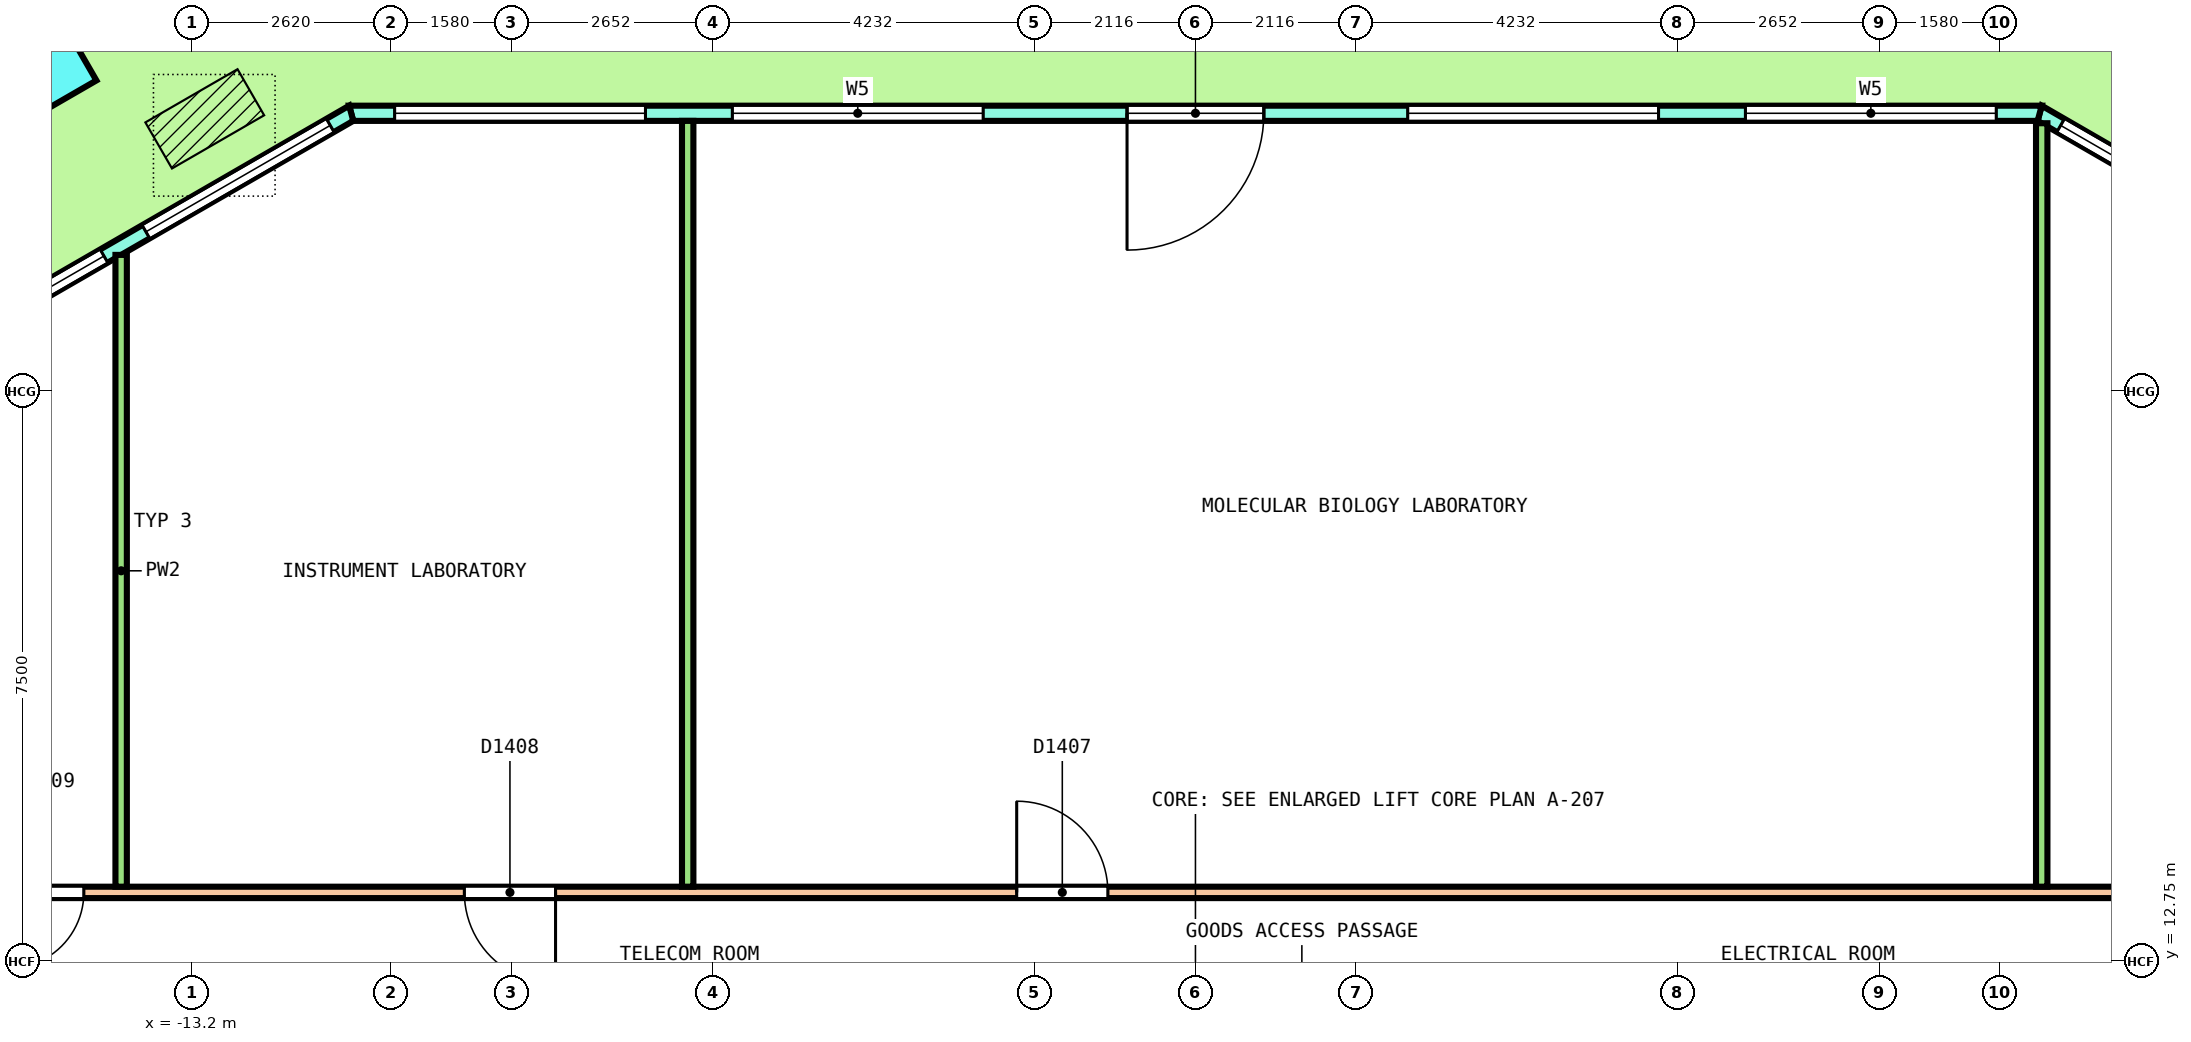
"""IFC4 building model, lengths in metres.
Left out: names, types, materials, properties, quantities, classifications, styles, units other than length and angle.
Written with IfcOpenShell. Run it as: python <this file> out.ifc"""

import sys

from ifc_helpers import new_model, si_unit, direction, frame, frame_2d, origin, origin_2d, place, context, subcontext, project, spatial, polyline, rectangle, outline, extrude, element, fill, save


model = new_model("IFC4")
c1 = context("Model", 3, precision=1e-05, world=origin(), true_north=direction((0.0, 1.0)))
c2 = subcontext(c1, "Body", "Model", "MODEL_VIEW")
j1 = project(units=[si_unit("LENGTHUNIT", "METRE"), si_unit("PLANEANGLEUNIT", "RADIAN")], contexts=[c1])
p1 = place(None, origin())
s1 = spatial("IfcSite", under=j1, at=p1, CompositionType="ELEMENT")
p2 = place(p1, origin())
s2 = spatial("IfcBuilding", under=s1, at=p2, CompositionType="ELEMENT")
p3 = place(p2, frame((0.0, 0.0, 49.8)))
s3 = spatial("IfcBuildingStorey", under=s2, at=p3, CompositionType="ELEMENT", Elevation=49.8)
p4 = place(p3, frame((-15.484, 24.606, 0.0), z_axis=(-0.036265236264, 0.0, 0.999342199969), x_axis=(-0.865313546461, -0.500246354177, -0.031401456084)))
e1 = element("IfcColumn", 1, at=p4, inside=s3, PredefinedType="COLUMN", context=c2, shape_type="SweptSolid", body=[
    extrude(rectangle(XDim=1.5, YDim=1.5, at=origin_2d()), origin(), (0.0, 0.0, 1.0), 4.053),
])
p5 = place(p3, frame((17.061, 20.463, 0.0), z_axis=(0.0, 0.0, 1.0), x_axis=(-0.866029458321, 0.49999297727, 0.0)))
e2 = element("IfcWall", 2, at=p5, inside=s3, PredefinedType="SOLIDWALL", context=c2, shape_type="SweptSolid", body=[
    extrude(outline(polyline([(-0.027, -0.1), (1.128, -0.1), (2.282, -0.1), (3.437, -0.1), (4.592, -0.1), (5.747, -0.1), (6.901, -0.1), (6.848, 0.1), (5.711, 0.1), (4.574, 0.1), (3.437, 0.1), (2.301, 0.1), (1.164, 0.1), (0.027, 0.1), (-0.027, -0.1)])), origin(), (0.0, 0.0, 1.0), 4.1),
])
p6 = place(p5, frame((0.319, 0.0, 0.1)))
e3 = element("IfcOpeningElement", 3, at=p6, cuts=e2, PredefinedType="OPENING", context=c2, shape_type="SweptSolid", body=[
    extrude(rectangle(XDim=2.8, YDim=2.9, at=frame_2d((1.4, 1.45))), frame((0.0, 0.11, 0.0), z_axis=(0.0, -1.0, 0.0), x_axis=(1.0, 0.0, 0.0)), (0.0, 0.0, 1.0), 0.22),
])
p7 = place(p5, frame((3.756, 0.0, 0.1)))
e4 = element("IfcOpeningElement", 4, at=p7, cuts=e2, PredefinedType="OPENING", context=c2, shape_type="SweptSolid", body=[
    extrude(rectangle(XDim=2.8, YDim=2.9, at=frame_2d((1.4, 1.45))), frame((0.0, 0.11, 0.0), z_axis=(0.0, -1.0, 0.0), x_axis=(1.0, 0.0, 0.0)), (0.0, 0.0, 1.0), 0.22),
])
p8 = place(p3, frame((11.107, 23.9, 0.0), z_axis=(0.0, 0.0, 1.0), x_axis=(-1.0, 0.0, 0.0)))
e5 = element("IfcWall", 5, at=p8, inside=s3, PredefinedType="SOLIDWALL", context=c2, shape_type="SweptSolid", body=[
    extrude(outline(polyline([(-0.027, -0.1), (0.985, -0.1), (1.998, -0.1), (3.01, -0.1), (4.022, -0.1), (5.034, -0.1), (6.046, -0.1), (7.058, -0.1), (8.071, -0.1), (9.083, -0.1), (10.095, -0.1), (11.107, -0.1), (12.119, -0.1), (13.131, -0.1), (14.143, -0.1), (15.156, -0.1), (16.168, -0.1), (17.18, -0.1), (18.192, -0.1), (19.204, -0.1), (20.216, -0.1), (21.229, -0.1), (22.241, -0.1), (22.187, 0.1), (21.18, 0.1), (20.172, 0.1), (19.165, 0.1), (18.158, 0.1), (17.151, 0.1), (16.143, 0.1), (15.136, 0.1), (14.129, 0.1), (13.122, 0.1), (12.114, 0.1), (11.107, 0.1), (10.1, 0.1), (9.092, 0.1), (8.085, 0.1), (7.078, 0.1), (6.071, 0.1), (5.063, 0.1), (4.056, 0.1), (3.049, 0.1), (2.042, 0.1), (1.034, 0.1), (0.027, 0.1), (-0.027, -0.1)])), origin(), (0.0, 0.0, 1.0), 4.1),
])
p9 = place(p8, frame((0.571, 0.0, 0.1)))
e6 = element("IfcOpeningElement", 6, at=p9, cuts=e5, PredefinedType="OPENING", context=c2, shape_type="SweptSolid", body=[
    extrude(rectangle(XDim=3.3, YDim=2.9, at=frame_2d((1.65, 1.45))), frame((0.0, 0.11, 0.0), z_axis=(0.0, -1.0, 0.0), x_axis=(1.0, 0.0, 0.0)), (0.0, 0.0, 1.0), 0.22),
])
p10 = place(p8, frame((5.014, 0.0, 0.1)))
e7 = element("IfcOpeningElement", 7, at=p10, cuts=e5, PredefinedType="OPENING", context=c2, shape_type="SweptSolid", body=[
    extrude(rectangle(XDim=3.3, YDim=2.9, at=frame_2d((1.65, 1.45))), frame((0.0, 0.11, 0.0), z_axis=(0.0, -1.0, 0.0), x_axis=(1.0, 0.0, 0.0)), (0.0, 0.0, 1.0), 0.22),
])
p11 = place(p8, frame((10.207, 0.0, 0.0)))
e8 = element("IfcOpeningElement", 8, at=p11, cuts=e5, PredefinedType="OPENING", context=c2, shape_type="SweptSolid", body=[
    extrude(rectangle(XDim=1.8, YDim=2.4, at=frame_2d((0.9, 1.2))), frame((0.0, 0.11, 0.0), z_axis=(0.0, -1.0, 0.0), x_axis=(1.0, 0.0, 0.0)), (0.0, 0.0, 1.0), 0.22),
])
p12 = place(p8, frame((10.207, 0.0, 2.55)))
e9 = element("IfcOpeningElement", 9, at=p12, cuts=e5, PredefinedType="OPENING", context=c2, shape_type="SweptSolid", body=[
    extrude(rectangle(XDim=1.8, YDim=0.45, at=frame_2d((0.9, 0.225))), frame((0.0, 0.11, 0.0), z_axis=(0.0, -1.0, 0.0), x_axis=(1.0, 0.0, 0.0)), (0.0, 0.0, 1.0), 0.22),
])
p13 = place(p8, frame((13.9, 0.0, 0.1)))
e10 = element("IfcOpeningElement", 10, at=p13, cuts=e5, PredefinedType="OPENING", context=c2, shape_type="SweptSolid", body=[
    extrude(rectangle(XDim=3.3, YDim=2.9, at=frame_2d((1.65, 1.45))), frame((0.0, 0.11, 0.0), z_axis=(0.0, -1.0, 0.0), x_axis=(1.0, 0.0, 0.0)), (0.0, 0.0, 1.0), 0.22),
])
p14 = place(p8, frame((18.343, 0.0, 0.1)))
e11 = element("IfcOpeningElement", 11, at=p14, cuts=e5, PredefinedType="OPENING", context=c2, shape_type="SweptSolid", body=[
    extrude(rectangle(XDim=3.3, YDim=2.9, at=frame_2d((1.65, 1.45))), frame((0.0, 0.11, 0.0), z_axis=(0.0, -1.0, 0.0), x_axis=(1.0, 0.0, 0.0)), (0.0, 0.0, 1.0), 0.22),
])
p15 = place(p3, frame((-11.107, 23.9, 0.0), z_axis=(0.0, 0.0, 1.0), x_axis=(-0.866029458321, -0.49999297727, 0.0)))
e12 = element("IfcWall", 12, at=p15, inside=s3, PredefinedType="SOLIDWALL", context=c2, shape_type="SweptSolid", body=[
    extrude(outline(polyline([(-0.027, -0.1), (1.128, -0.1), (2.282, -0.1), (3.437, -0.1), (4.592, -0.1), (5.747, -0.1), (6.901, -0.1), (6.848, 0.1), (5.711, 0.1), (4.574, 0.1), (3.437, 0.1), (2.301, 0.1), (1.164, 0.1), (0.027, 0.1), (-0.027, -0.1)])), origin(), (0.0, 0.0, 1.0), 4.1),
])
p16 = place(p15, frame((0.319, 0.0, 0.1)))
e13 = element("IfcOpeningElement", 13, at=p16, cuts=e12, PredefinedType="OPENING", context=c2, shape_type="SweptSolid", body=[
    extrude(rectangle(XDim=2.8, YDim=2.9, at=frame_2d((1.4, 1.45))), frame((0.0, 0.11, 0.0), z_axis=(0.0, -1.0, 0.0), x_axis=(1.0, 0.0, 0.0)), (0.0, 0.0, 1.0), 0.22),
])
p17 = place(p15, frame((3.756, 0.0, 0.1)))
e14 = element("IfcOpeningElement", 14, at=p17, cuts=e12, PredefinedType="OPENING", context=c2, shape_type="SweptSolid", body=[
    extrude(rectangle(XDim=2.8, YDim=2.9, at=frame_2d((1.4, 1.45))), frame((0.0, 0.11, 0.0), z_axis=(0.0, -1.0, 0.0), x_axis=(1.0, 0.0, 0.0)), (0.0, 0.0, 1.0), 0.22),
])
p18 = place(p3, frame((-15.975, 13.65, 0.0), z_axis=(0.0, 0.0, 1.0), x_axis=(1.0, 0.0, 0.0)))
e15 = element("IfcWall", 15, at=p18, inside=s3, PredefinedType="PARTITIONING", context=c2, shape_type="SweptSolid", body=[
    extrude(rectangle(XDim=31.95, YDim=0.15, at=frame_2d((15.975, 0.0))), origin(), (0.0, 0.0, 1.0), 3.05),
])
p19 = place(p18, frame((28.967, 0.0, 0.0)))
e16 = element("IfcOpeningElement", 16, at=p19, cuts=e15, PredefinedType="OPENING", context=c2, shape_type="SweptSolid", body=[
    extrude(rectangle(XDim=1.2, YDim=2.1, at=frame_2d((0.6, 1.05))), frame((0.0, 0.085, 0.0), z_axis=(0.0, -1.0, 0.0), x_axis=(1.0, 0.0, 0.0)), (0.0, 0.0, 1.0), 0.17),
])
p20 = place(p18, frame((13.623, 0.0, 0.0)))
e17 = element("IfcOpeningElement", 17, at=p20, cuts=e15, PredefinedType="OPENING", context=c2, shape_type="SweptSolid", body=[
    extrude(rectangle(XDim=1.2, YDim=2.1, at=frame_2d((0.6, 1.05))), frame((0.0, 0.085, 0.0), z_axis=(0.0, -1.0, 0.0), x_axis=(1.0, 0.0, 0.0)), (0.0, 0.0, 1.0), 0.17),
])
p21 = place(p18, frame((6.356, 0.0, 0.0)))
e18 = element("IfcOpeningElement", 18, at=p21, cuts=e15, PredefinedType="OPENING", context=c2, shape_type="SweptSolid", body=[
    extrude(rectangle(XDim=1.2, YDim=2.1, at=frame_2d((0.6, 1.05))), frame((0.0, 0.085, 0.0), z_axis=(0.0, -1.0, 0.0), x_axis=(1.0, 0.0, 0.0)), (0.0, 0.0, 1.0), 0.17),
])
p22 = place(p18, frame((0.351, 0.0, 0.0)))
e19 = element("IfcOpeningElement", 19, at=p22, cuts=e15, PredefinedType="OPENING", context=c2, shape_type="SweptSolid", body=[
    extrude(rectangle(XDim=1.0, YDim=2.1, at=frame_2d((0.5, 1.05))), frame((0.0, 0.085, 0.0), z_axis=(0.0, -1.0, 0.0), x_axis=(1.0, 0.0, 0.0)), (0.0, 0.0, 1.0), 0.17),
])
p23 = place(p3, frame((11.134, 13.725, 0.0), z_axis=(0.0, 0.0, 1.0), x_axis=(0.0, 1.0, 0.0)))
e20 = element("IfcWall", 20, at=p23, inside=s3, PredefinedType="PARTITIONING", context=c2, shape_type="SweptSolid", body=[
    extrude(rectangle(XDim=10.044, YDim=0.15, at=frame_2d((5.022, 0.0))), origin(), (0.0, 0.0, 1.0), 3.05),
])
p24 = place(p3, frame((-6.68, 13.725, 0.0), z_axis=(0.0, 0.0, 1.0), x_axis=(0.0, 1.0, 0.0)))
e21 = element("IfcWall", 21, at=p24, inside=s3, PredefinedType="PARTITIONING", context=c2, shape_type="SweptSolid", body=[
    extrude(rectangle(XDim=10.075, YDim=0.15, at=frame_2d((5.038, 0.0))), origin(), (0.0, 0.0, 1.0), 3.05),
])
p25 = place(p3, frame((-14.134, 13.725, 0.0), z_axis=(0.0, 0.0, 1.0), x_axis=(0.0, 1.0, 0.0)))
e22 = element("IfcWall", 22, at=p25, inside=s3, PredefinedType="PARTITIONING", context=c2, shape_type="SweptSolid", body=[
    extrude(rectangle(XDim=8.312, YDim=0.15, at=frame_2d((4.156, 0.0))), origin(), (0.0, 0.0, 1.0), 3.05),
])
p26 = place(p7, origin())
e23 = element("IfcWindow", 23, at=p26, inside=s3, PartitioningType="SINGLE_PANEL", PredefinedType="WINDOW", context=c2, shape_type="SweptSolid", body=[
    extrude(rectangle(XDim=2.8, YDim=2.9, at=frame_2d((1.4, 1.45))), frame((0.0, 0.03, 0.0), z_axis=(0.0, -1.0, 0.0), x_axis=(1.0, 0.0, 0.0)), (0.0, 0.0, 1.0), 0.06),
])
fill(e4, e23)
p27 = place(p9, origin())
e24 = element("IfcWindow", 24, at=p27, inside=s3, PartitioningType="SINGLE_PANEL", PredefinedType="WINDOW", context=c2, shape_type="SweptSolid", body=[
    extrude(rectangle(XDim=3.3, YDim=2.9, at=frame_2d((1.65, 1.45))), frame((0.0, 0.03, 0.0), z_axis=(0.0, -1.0, 0.0), x_axis=(1.0, 0.0, 0.0)), (0.0, 0.0, 1.0), 0.06),
])
fill(e6, e24)
p28 = place(p10, origin())
e25 = element("IfcWindow", 25, at=p28, inside=s3, PartitioningType="SINGLE_PANEL", PredefinedType="WINDOW", context=c2, shape_type="SweptSolid", body=[
    extrude(rectangle(XDim=3.3, YDim=2.9, at=frame_2d((1.65, 1.45))), frame((0.0, 0.03, 0.0), z_axis=(0.0, -1.0, 0.0), x_axis=(1.0, 0.0, 0.0)), (0.0, 0.0, 1.0), 0.06),
])
fill(e7, e25)
p29 = place(p11, origin())
e26 = element("IfcDoor", 26, at=p29, inside=s3, OperationType="DOUBLE_DOOR_SINGLE_SWING", PredefinedType="DOOR", context=c2, shape_type="SweptSolid", body=[
    extrude(rectangle(XDim=1.8, YDim=2.4, at=frame_2d((0.9, 1.2))), frame((0.0, 0.025, 0.0), z_axis=(0.0, -1.0, 0.0), x_axis=(1.0, 0.0, 0.0)), (0.0, 0.0, 1.0), 0.05),
])
fill(e8, e26)
p30 = place(p12, origin())
e27 = element("IfcWindow", 27, at=p30, inside=s3, PartitioningType="SINGLE_PANEL", PredefinedType="WINDOW", context=c2, shape_type="SweptSolid", body=[
    extrude(rectangle(XDim=1.8, YDim=0.45, at=frame_2d((0.9, 0.225))), frame((0.0, 0.03, 0.0), z_axis=(0.0, -1.0, 0.0), x_axis=(1.0, 0.0, 0.0)), (0.0, 0.0, 1.0), 0.06),
])
fill(e9, e27)
p31 = place(p13, origin())
e28 = element("IfcWindow", 28, at=p31, inside=s3, PartitioningType="SINGLE_PANEL", PredefinedType="WINDOW", context=c2, shape_type="SweptSolid", body=[
    extrude(rectangle(XDim=3.3, YDim=2.9, at=frame_2d((1.65, 1.45))), frame((0.0, 0.03, 0.0), z_axis=(0.0, -1.0, 0.0), x_axis=(1.0, 0.0, 0.0)), (0.0, 0.0, 1.0), 0.06),
])
fill(e10, e28)
p32 = place(p14, origin())
e29 = element("IfcWindow", 29, at=p32, inside=s3, PartitioningType="SINGLE_PANEL", PredefinedType="WINDOW", context=c2, shape_type="SweptSolid", body=[
    extrude(rectangle(XDim=3.3, YDim=2.9, at=frame_2d((1.65, 1.45))), frame((0.0, 0.03, 0.0), z_axis=(0.0, -1.0, 0.0), x_axis=(1.0, 0.0, 0.0)), (0.0, 0.0, 1.0), 0.06),
])
fill(e11, e29)
p33 = place(p16, origin())
e30 = element("IfcWindow", 30, at=p33, inside=s3, PartitioningType="SINGLE_PANEL", PredefinedType="WINDOW", context=c2, shape_type="SweptSolid", body=[
    extrude(rectangle(XDim=2.8, YDim=2.9, at=frame_2d((1.4, 1.45))), frame((0.0, 0.03, 0.0), z_axis=(0.0, -1.0, 0.0), x_axis=(1.0, 0.0, 0.0)), (0.0, 0.0, 1.0), 0.06),
])
fill(e13, e30)
p34 = place(p17, origin())
e31 = element("IfcWindow", 31, at=p34, inside=s3, PartitioningType="SINGLE_PANEL", PredefinedType="WINDOW", context=c2, shape_type="SweptSolid", body=[
    extrude(rectangle(XDim=2.8, YDim=2.9, at=frame_2d((1.4, 1.45))), frame((0.0, 0.03, 0.0), z_axis=(0.0, -1.0, 0.0), x_axis=(1.0, 0.0, 0.0)), (0.0, 0.0, 1.0), 0.06),
])
fill(e14, e31)
p35 = place(p20, origin())
e32 = element("IfcDoor", 32, at=p35, inside=s3, OperationType="DOUBLE_DOOR_SINGLE_SWING", PredefinedType="DOOR", context=c2, shape_type="SweptSolid", body=[
    extrude(rectangle(XDim=1.2, YDim=2.1, at=frame_2d((0.6, 1.05))), frame((0.0, 0.025, 0.0), z_axis=(0.0, -1.0, 0.0), x_axis=(1.0, 0.0, 0.0)), (0.0, 0.0, 1.0), 0.05),
])
fill(e17, e32)
p36 = place(p21, origin())
e33 = element("IfcDoor", 33, at=p36, inside=s3, OperationType="DOUBLE_DOOR_SINGLE_SWING", PredefinedType="DOOR", context=c2, shape_type="SweptSolid", body=[
    extrude(rectangle(XDim=1.2, YDim=2.1, at=frame_2d((0.6, 1.05))), frame((0.0, 0.025, 0.0), z_axis=(0.0, -1.0, 0.0), x_axis=(1.0, 0.0, 0.0)), (0.0, 0.0, 1.0), 0.05),
])
fill(e18, e33)
p37 = place(p22, origin())
e34 = element("IfcDoor", 34, at=p37, inside=s3, OperationType="SINGLE_SWING_LEFT", PredefinedType="DOOR", context=c2, shape_type="SweptSolid", body=[
    extrude(rectangle(XDim=1.0, YDim=2.1, at=frame_2d((0.5, 1.05))), frame((0.0, 0.025, 0.0), z_axis=(0.0, -1.0, 0.0), x_axis=(1.0, 0.0, 0.0)), (0.0, 0.0, 1.0), 0.05),
])
fill(e19, e34)
save(model, sys.argv[1])
